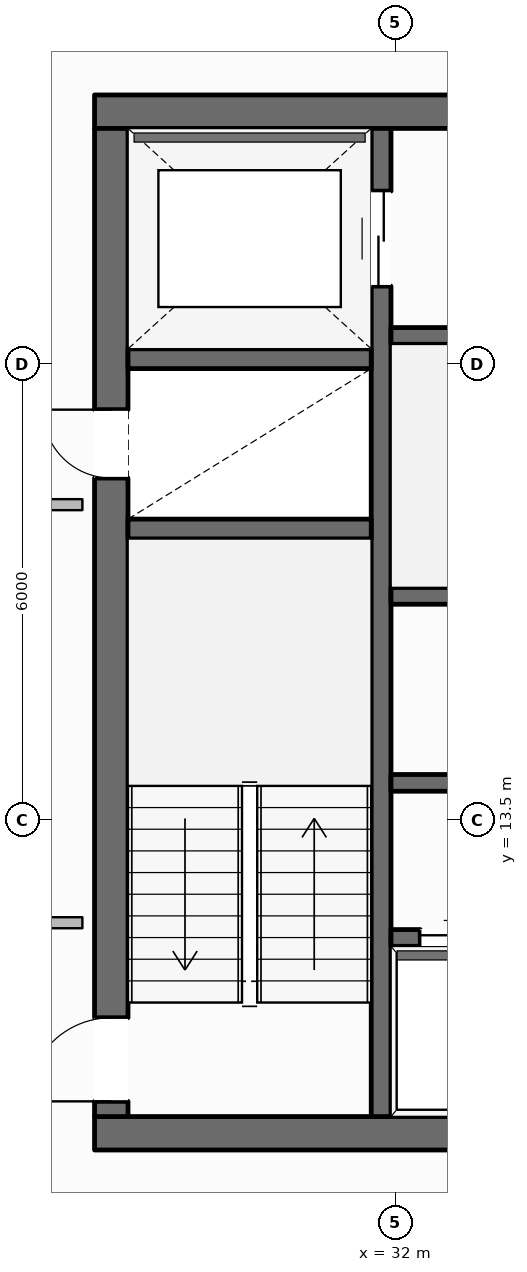
"""IFC4 building model, lengths in metres.
Left out: names, types, materials, properties, quantities, classifications, styles, units other than length and angle.
Written with IfcOpenShell. Run it as: python <this file> out.ifc"""

import sys

from ifc_helpers import new_model, si_unit, direction, frame, frame_2d, origin, place, context, subcontext, project, spatial, rectangle, extrude, element, fill, save


model = new_model("IFC4")
c1 = context("Model", 3, precision=1e-05, world=origin(), true_north=direction((0.0, 1.0)))
c2 = subcontext(c1, "Body", "Model", "MODEL_VIEW")
j1 = project(units=[si_unit("LENGTHUNIT", "METRE"), si_unit("PLANEANGLEUNIT", "RADIAN")], contexts=[c1])
p1 = place(None, origin())
s1 = spatial("IfcSite", under=j1, at=p1, CompositionType="ELEMENT")
p2 = place(p1, origin())
s2 = spatial("IfcBuilding", under=s1, at=p2, CompositionType="ELEMENT")
p3 = place(p2, frame((0.0, 0.0, 215.05)))
s3 = spatial("IfcBuildingStorey", under=s2, at=p3, CompositionType="ELEMENT", Elevation=215.05)
p4 = place(p3, frame((28.04, 9.38, 0.0), z_axis=(0.0, 0.0, 1.0), x_axis=(1.0, 0.0, 0.0)))
e1 = element("IfcWall", 1, at=p4, inside=s3, PredefinedType="SOLIDWALL", context=c2, shape_type="SweptSolid", body=[
    extrude(rectangle(XDim=19.92, YDim=0.44, at=frame_2d((9.96, 0.0))), origin(), (0.0, 0.0, 1.0), 3.6),
])
p5 = place(p4, frame((10.46, 0.0, 0.0)))
e2 = element("IfcOpeningElement", 2, at=p5, cuts=e1, PredefinedType="OPENING", context=c2, shape_type="SweptSolid", body=[
    extrude(rectangle(XDim=1.4, YDim=2.2, at=frame_2d((0.7, 1.1))), frame((0.0, 0.23, 0.0), z_axis=(0.0, -1.0, 0.0), x_axis=(1.0, 0.0, 0.0)), (0.0, 0.0, 1.0), 0.46),
])
p6 = place(p3, frame((28.04, 22.82, 0.0), z_axis=(0.0, 0.0, 1.0), x_axis=(1.0, 0.0, 0.0)))
e3 = element("IfcWall", 3, at=p6, inside=s3, PredefinedType="SOLIDWALL", context=c2, shape_type="SweptSolid", body=[
    extrude(rectangle(XDim=19.92, YDim=0.44, at=frame_2d((9.96, 0.0))), origin(), (0.0, 0.0, 1.0), 3.6),
])
p7 = place(p6, frame((6.235, 0.0, 0.0)))
e4 = element("IfcOpeningElement", 4, at=p7, cuts=e3, PredefinedType="OPENING", context=c2, shape_type="SweptSolid", body=[
    extrude(rectangle(XDim=1.05, YDim=2.15, at=frame_2d((0.525, 1.075))), frame((0.0, 0.23, 0.0), z_axis=(0.0, -1.0, 0.0), x_axis=(1.0, 0.0, 0.0)), (0.0, 0.0, 1.0), 0.46),
])
p8 = place(p6, frame((12.635, 0.0, 0.0)))
e5 = element("IfcOpeningElement", 5, at=p8, cuts=e3, PredefinedType="OPENING", context=c2, shape_type="SweptSolid", body=[
    extrude(rectangle(XDim=1.05, YDim=2.15, at=frame_2d((0.525, 1.075))), frame((0.0, 0.23, 0.0), z_axis=(0.0, -1.0, 0.0), x_axis=(1.0, 0.0, 0.0)), (0.0, 0.0, 1.0), 0.46),
])
p9 = place(p3, frame((28.26, 9.6, 0.0), z_axis=(0.0, 0.0, 1.0), x_axis=(0.0, 1.0, 0.0)))
e6 = element("IfcWall", 6, at=p9, inside=s3, PredefinedType="SOLIDWALL", context=c2, shape_type="SweptSolid", body=[
    extrude(rectangle(XDim=13.0, YDim=0.44, at=frame_2d((6.5, 0.0))), origin(), (0.0, 0.0, 1.0), 3.6),
])
p10 = place(p9, frame((0.2, 0.0, 0.0)))
e7 = element("IfcOpeningElement", 7, at=p10, cuts=e6, PredefinedType="OPENING", context=c2, shape_type="SweptSolid", body=[
    extrude(rectangle(XDim=1.1, YDim=2.15, at=frame_2d((0.55, 1.075))), frame((0.0, 0.23, 0.0), z_axis=(0.0, -1.0, 0.0), x_axis=(1.0, 0.0, 0.0)), (0.0, 0.0, 1.0), 0.46),
])
p11 = place(p9, frame((8.4, 0.0, 0.0)))
e8 = element("IfcOpeningElement", 8, at=p11, cuts=e6, PredefinedType="OPENING", context=c2, shape_type="SweptSolid", body=[
    extrude(rectangle(XDim=0.9, YDim=2.1, at=frame_2d((0.45, 1.05))), frame((0.0, 0.23, 0.0), z_axis=(0.0, -1.0, 0.0), x_axis=(1.0, 0.0, 0.0)), (0.0, 0.0, 1.0), 0.46),
])
p12 = place(p3, frame((31.81, 9.6, 0.0), z_axis=(0.0, 0.0, 1.0), x_axis=(0.0, 1.0, 0.0)))
e9 = element("IfcWall", 9, at=p12, inside=s3, PredefinedType="SHEAR", context=c2, shape_type="SweptSolid", body=[
    extrude(rectangle(XDim=13.0, YDim=0.26, at=frame_2d((6.5, 0.0))), origin(), (0.0, 0.0, 1.0), 3.6),
])
p13 = place(p12, frame((10.925, 0.0, 0.0)))
e10 = element("IfcOpeningElement", 10, at=p13, cuts=e9, PredefinedType="OPENING", context=c2, shape_type="SweptSolid", body=[
    extrude(rectangle(XDim=1.25, YDim=2.25, at=frame_2d((0.625, 1.125))), frame((0.0, 0.14, 0.0), z_axis=(0.0, -1.0, 0.0), x_axis=(1.0, 0.0, 0.0)), (0.0, 0.0, 1.0), 0.28),
])
for number, where, z_axis, x_axis in (
    (11, (28.48, 17.33, 0.0), (0.0, 0.0, 1.0), (1.0, 0.0, 0.0)),
    (12, (28.48, 19.57, 0.0), (0.0, 0.0, 1.0), (1.0, 0.0, 0.0)),
):
    element("IfcWall", number, at=place(p3, frame(where, z_axis=z_axis, x_axis=x_axis)), inside=s3, PredefinedType="SHEAR", context=c2, shape_type="SweptSolid", body=[
        extrude(rectangle(XDim=3.2, YDim=0.26, at=frame_2d((1.6, 0.0))), origin(), (0.0, 0.0, 1.0), 3.6),
    ])
p14 = place(p3, frame((31.94, 19.87, 0.0), z_axis=(0.0, 0.0, 1.0), x_axis=(1.0, 0.0, 0.0)))
e13 = element("IfcWall", 13, at=p14, inside=s3, PredefinedType="SOLIDWALL", context=c2, shape_type="SweptSolid", body=[
    extrude(rectangle(XDim=12.12, YDim=0.22, at=frame_2d((6.06, 0.0))), origin(), (0.0, 0.0, 1.0), 3.6),
])
p15 = place(p14, frame((6.3, 0.0, 0.0)))
e14 = element("IfcOpeningElement", 14, at=p15, cuts=e13, PredefinedType="OPENING", context=c2, shape_type="SweptSolid", body=[
    extrude(rectangle(XDim=1.1, YDim=2.15, at=frame_2d((0.55, 1.075))), frame((0.0, 0.12, 0.0), z_axis=(0.0, -1.0, 0.0), x_axis=(1.0, 0.0, 0.0)), (0.0, 0.0, 1.0), 0.24),
])
p16 = place(p14, frame((8.01, 0.0, 0.0)))
e15 = element("IfcOpeningElement", 15, at=p16, cuts=e13, PredefinedType="OPENING", context=c2, shape_type="SweptSolid", body=[
    extrude(rectangle(XDim=0.9, YDim=2.1, at=frame_2d((0.45, 1.05))), frame((0.0, 0.12, 0.0), z_axis=(0.0, -1.0, 0.0), x_axis=(1.0, 0.0, 0.0)), (0.0, 0.0, 1.0), 0.24),
])
p17 = place(p14, frame((10.21, 0.0, 0.0)))
e16 = element("IfcOpeningElement", 16, at=p17, cuts=e13, PredefinedType="OPENING", context=c2, shape_type="SweptSolid", body=[
    extrude(rectangle(XDim=0.9, YDim=2.1, at=frame_2d((0.45, 1.05))), frame((0.0, 0.12, 0.0), z_axis=(0.0, -1.0, 0.0), x_axis=(1.0, 0.0, 0.0)), (0.0, 0.0, 1.0), 0.24),
])
p18 = place(p3, frame((31.94, 16.45, 0.0), z_axis=(0.0, 0.0, 1.0), x_axis=(1.0, 0.0, 0.0)))
e17 = element("IfcWall", 17, at=p18, inside=s3, PredefinedType="SOLIDWALL", context=c2, shape_type="SweptSolid", body=[
    extrude(rectangle(XDim=12.12, YDim=0.22, at=frame_2d((6.06, 0.0))), origin(), (0.0, 0.0, 1.0), 3.6),
])
p19 = place(p3, frame((31.94, 13.99, 0.0), z_axis=(0.0, 0.0, 1.0), x_axis=(1.0, 0.0, 0.0)))
e18 = element("IfcWall", 18, at=p19, inside=s3, PredefinedType="SOLIDWALL", context=c2, shape_type="SweptSolid", body=[
    extrude(rectangle(XDim=12.12, YDim=0.22, at=frame_2d((6.06, 0.0))), origin(), (0.0, 0.0, 1.0), 3.6),
])
p20 = place(p19, frame((1.91, 0.0, 0.0)))
e19 = element("IfcOpeningElement", 19, at=p20, cuts=e18, PredefinedType="OPENING", context=c2, shape_type="SweptSolid", body=[
    extrude(rectangle(XDim=0.9, YDim=2.1, at=frame_2d((0.45, 1.05))), frame((0.0, 0.12, 0.0), z_axis=(0.0, -1.0, 0.0), x_axis=(1.0, 0.0, 0.0)), (0.0, 0.0, 1.0), 0.24),
])
p21 = place(p19, frame((7.95, 0.0, 0.0)))
e20 = element("IfcOpeningElement", 20, at=p21, cuts=e18, PredefinedType="OPENING", context=c2, shape_type="SweptSolid", body=[
    extrude(rectangle(XDim=1.02, YDim=2.15, at=frame_2d((0.51, 1.075))), frame((0.0, 0.12, 0.0), z_axis=(0.0, -1.0, 0.0), x_axis=(1.0, 0.0, 0.0)), (0.0, 0.0, 1.0), 0.24),
])
p22 = place(p3, frame((31.94, 11.95, 0.0), z_axis=(0.0, 0.0, 1.0), x_axis=(1.0, 0.0, 0.0)))
e21 = element("IfcWall", 21, at=p22, inside=s3, PredefinedType="SOLIDWALL", context=c2, shape_type="SweptSolid", body=[
    extrude(rectangle(XDim=6.19, YDim=0.22, at=frame_2d((3.095, 0.0))), origin(), (0.0, 0.0, 1.0), 3.6),
])
p23 = place(p22, frame((0.385, 0.0, 0.0)))
e22 = element("IfcOpeningElement", 22, at=p23, cuts=e21, PredefinedType="OPENING", context=c2, shape_type="SweptSolid", body=[
    extrude(rectangle(XDim=1.1, YDim=2.2, at=frame_2d((0.55, 1.1))), frame((0.0, 0.12, 0.0), z_axis=(0.0, -1.0, 0.0), x_axis=(1.0, 0.0, 0.0)), (0.0, 0.0, 1.0), 0.24),
])
p24 = place(p22, frame((2.435, 0.0, 0.0)))
e23 = element("IfcOpeningElement", 23, at=p24, cuts=e21, PredefinedType="OPENING", context=c2, shape_type="SweptSolid", body=[
    extrude(rectangle(XDim=1.1, YDim=2.2, at=frame_2d((0.55, 1.1))), frame((0.0, 0.12, 0.0), z_axis=(0.0, -1.0, 0.0), x_axis=(1.0, 0.0, 0.0)), (0.0, 0.0, 1.0), 0.24),
])
p25 = place(p22, frame((4.485, 0.0, 0.0)))
e24 = element("IfcOpeningElement", 24, at=p25, cuts=e21, PredefinedType="OPENING", context=c2, shape_type="SweptSolid", body=[
    extrude(rectangle(XDim=1.1, YDim=2.2, at=frame_2d((0.55, 1.1))), frame((0.0, 0.12, 0.0), z_axis=(0.0, -1.0, 0.0), x_axis=(1.0, 0.0, 0.0)), (0.0, 0.0, 1.0), 0.24),
])
p26 = place(p3, frame((14.13, 10.825, 0.0), z_axis=(0.0, 0.0, 1.0), x_axis=(0.506658543763, 0.862146808863, 0.0)))
e25 = element("IfcWall", 25, at=p26, inside=s3, PredefinedType="STANDARD", context=c2, shape_type="SweptSolid", body=[
    extrude(rectangle(XDim=39.014, YDim=0.35, at=frame_2d((19.507, 0.0))), origin(), (0.0, 0.0, 1.0), 3.132),
])
p27 = place(p26, frame((9.354, 0.0, 0.0)))
e26 = element("IfcOpeningElement", 26, at=p27, cuts=e25, PredefinedType="OPENING", context=c2, shape_type="SweptSolid", body=[
    extrude(rectangle(XDim=1.0, YDim=2.2, at=frame_2d((0.5, 1.1))), frame((0.0, 0.185, 0.0), z_axis=(0.0, -1.0, 0.0), x_axis=(1.0, 0.0, 0.0)), (0.0, 0.0, 1.0), 0.37),
])
p28 = place(p26, frame((34.645, 0.0, 0.65)))
e27 = element("IfcOpeningElement", 27, at=p28, cuts=e25, PredefinedType="OPENING", context=c2, shape_type="SweptSolid", body=[
    extrude(rectangle(XDim=1.45, YDim=1.75, at=frame_2d((0.725, 0.875))), frame((0.0, 0.185, 0.0), z_axis=(0.0, -1.0, 0.0), x_axis=(1.0, 0.0, 0.0)), (0.0, 0.0, 1.0), 0.37),
])
p29 = place(p26, frame((28.301, 0.0, 0.65)))
e28 = element("IfcOpeningElement", 28, at=p29, cuts=e25, PredefinedType="OPENING", context=c2, shape_type="SweptSolid", body=[
    extrude(rectangle(XDim=1.45, YDim=1.75, at=frame_2d((0.725, 0.875))), frame((0.0, 0.185, 0.0), z_axis=(0.0, -1.0, 0.0), x_axis=(1.0, 0.0, 0.0)), (0.0, 0.0, 1.0), 0.37),
])
p30 = place(p26, frame((21.958, 0.0, 0.65)))
e29 = element("IfcOpeningElement", 29, at=p30, cuts=e25, PredefinedType="OPENING", context=c2, shape_type="SweptSolid", body=[
    extrude(rectangle(XDim=1.45, YDim=1.75, at=frame_2d((0.725, 0.875))), frame((0.0, 0.185, 0.0), z_axis=(0.0, -1.0, 0.0), x_axis=(1.0, 0.0, 0.0)), (0.0, 0.0, 1.0), 0.37),
])
p31 = place(p26, frame((2.926, 0.0, 0.65)))
e30 = element("IfcOpeningElement", 30, at=p31, cuts=e25, PredefinedType="OPENING", context=c2, shape_type="SweptSolid", body=[
    extrude(rectangle(XDim=1.45, YDim=1.75, at=frame_2d((0.725, 0.875))), frame((0.0, 0.185, 0.0), z_axis=(0.0, -1.0, 0.0), x_axis=(1.0, 0.0, 0.0)), (0.0, 0.0, 1.0), 0.37),
])
for number, where, z_axis, x_axis in (
    (31, (27.88, 17.65, 0.0), (0.0, 0.0, 1.0), (-1.0, 0.0, 0.0)),
    (32, (26.06, 12.15, 0.0), (0.0, 0.0, 1.0), (1.0, 0.0, 0.0)),
):
    element("IfcWall", number, at=place(p3, frame(where, z_axis=z_axis, x_axis=x_axis)), inside=s3, PredefinedType="PARTITIONING", context=c2, shape_type="SweptSolid", body=[
        extrude(rectangle(XDim=1.82, YDim=0.145, at=frame_2d((0.91, 0.0))), origin(), (0.0, 0.0, 1.0), 3.6),
    ])
p32 = place(p10, origin())
e33 = element("IfcDoor", 33, at=p32, inside=s3, OperationType="SINGLE_SWING_LEFT", PredefinedType="DOOR", context=c2, shape_type="SweptSolid", body=[
    extrude(rectangle(XDim=1.1, YDim=2.15, at=frame_2d((0.55, 1.075))), frame((0.0, 0.025, 0.0), z_axis=(0.0, -1.0, 0.0), x_axis=(1.0, 0.0, 0.0)), (0.0, 0.0, 1.0), 0.05),
])
fill(e7, e33)
p33 = place(p11, origin())
e34 = element("IfcDoor", 34, at=p33, inside=s3, OperationType="SINGLE_SWING_RIGHT", PredefinedType="DOOR", context=c2, shape_type="SweptSolid", body=[
    extrude(rectangle(XDim=0.9, YDim=2.1, at=frame_2d((0.45, 1.05))), frame((0.0, 0.025, 0.0), z_axis=(0.0, -1.0, 0.0), x_axis=(1.0, 0.0, 0.0)), (0.0, 0.0, 1.0), 0.05),
])
fill(e8, e34)
p34 = place(p13, origin())
e35 = element("IfcDoor", 35, at=p34, inside=s3, OperationType="DOUBLE_DOOR_SLIDING", PredefinedType="DOOR", context=c2, shape_type="SweptSolid", body=[
    extrude(rectangle(XDim=1.25, YDim=2.25, at=frame_2d((0.625, 1.125))), frame((0.0, 0.025, 0.0), z_axis=(0.0, -1.0, 0.0), x_axis=(1.0, 0.0, 0.0)), (0.0, 0.0, 1.0), 0.05),
])
fill(e10, e35)
p35 = place(p23, origin())
e36 = element("IfcDoor", 36, at=p35, inside=s3, OperationType="DOUBLE_DOOR_SLIDING", PredefinedType="DOOR", context=c2, shape_type="SweptSolid", body=[
    extrude(rectangle(XDim=1.1, YDim=2.2, at=frame_2d((0.55, 1.1))), frame((0.0, 0.025, 0.0), z_axis=(0.0, -1.0, 0.0), x_axis=(1.0, 0.0, 0.0)), (0.0, 0.0, 1.0), 0.05),
])
fill(e22, e36)
save(model, sys.argv[1])
